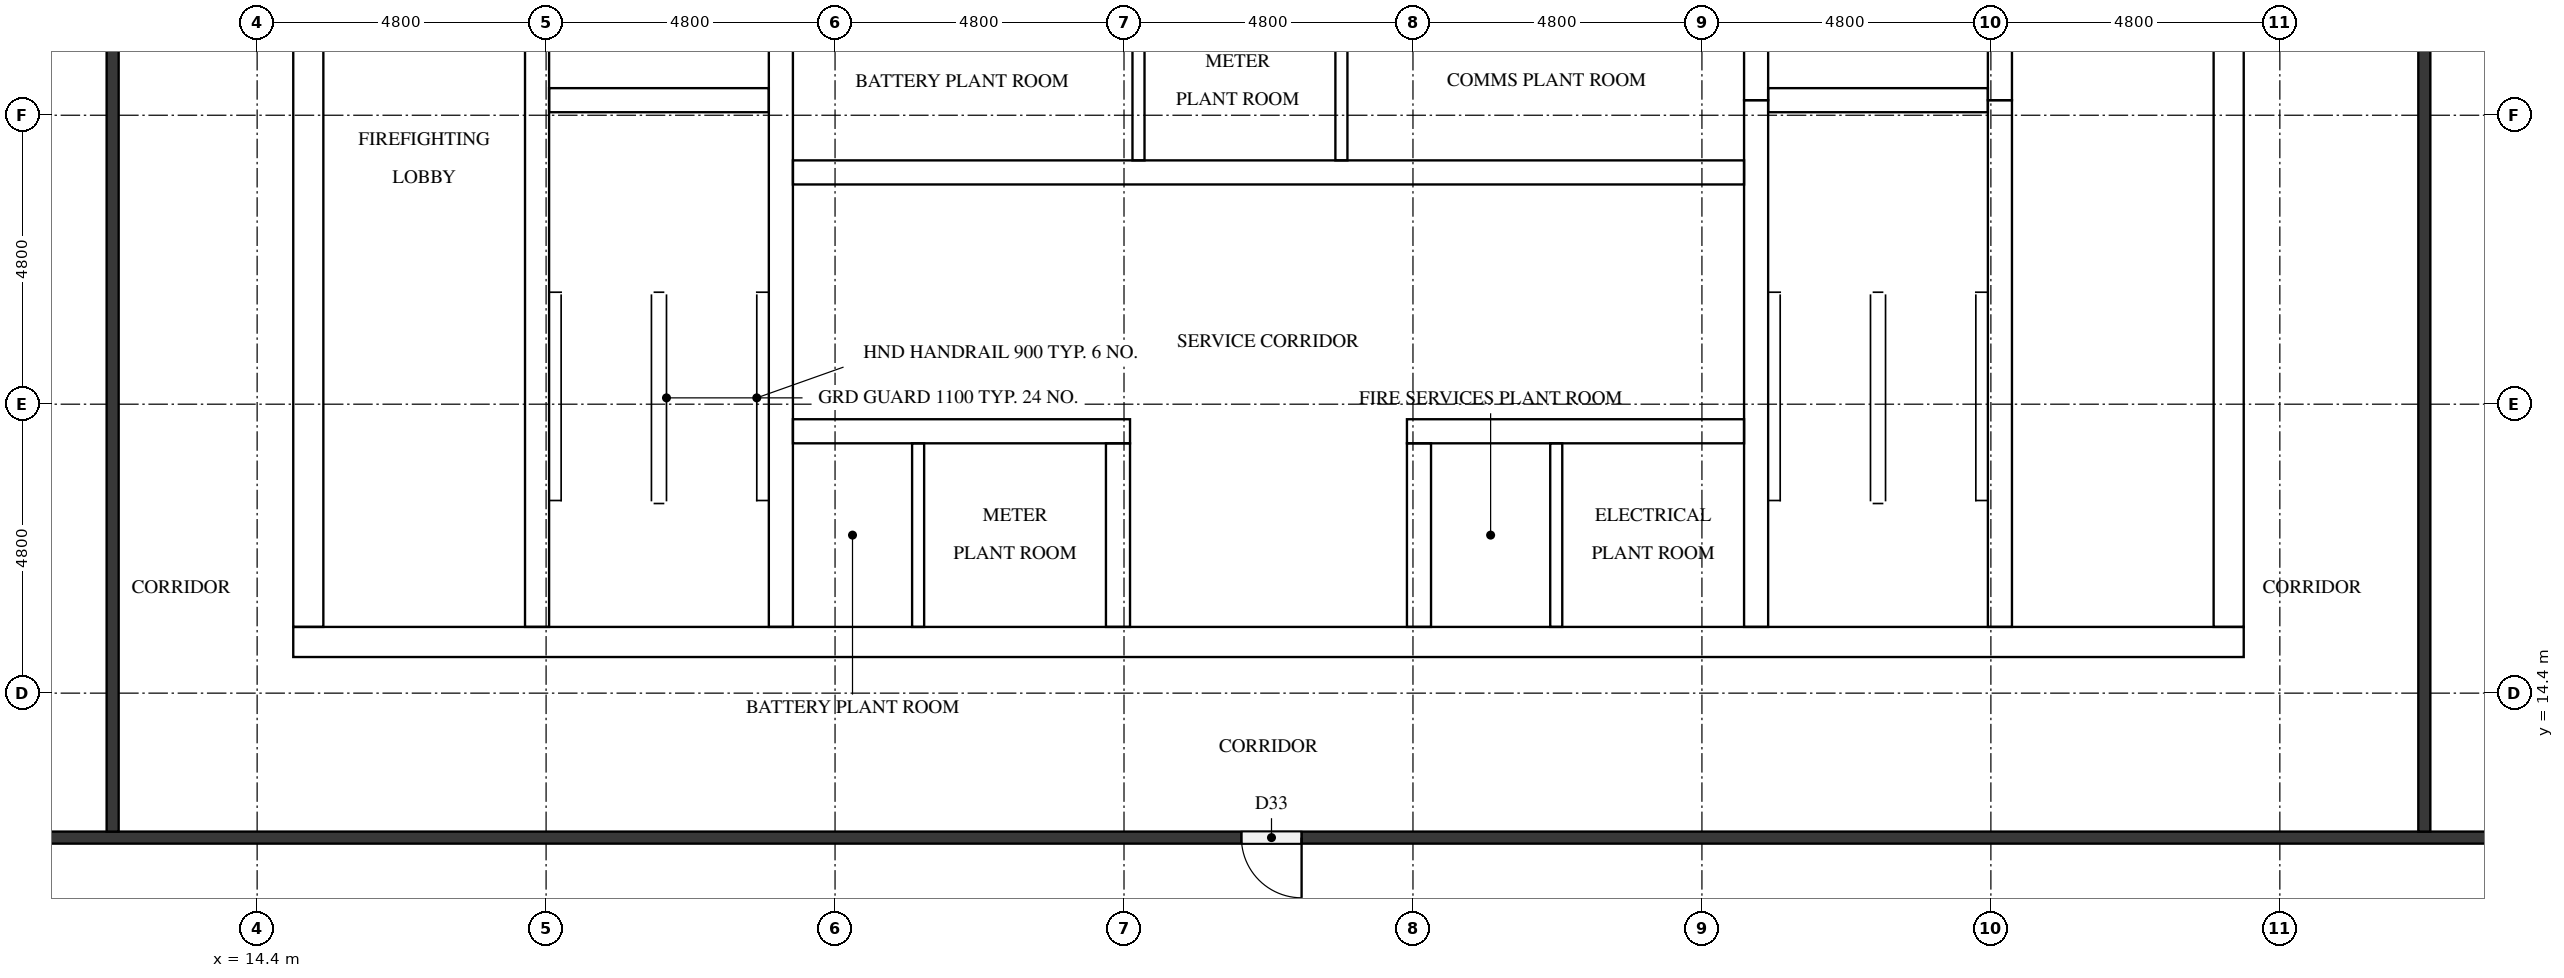
"""IFC4 building model, lengths in metres.
Left out: names, types, materials, properties, quantities, classifications, styles, units other than length and angle.
Written with IfcOpenShell. Run it as: python <this file> out.ifc"""

import sys

from ifc_helpers import new_model, si_unit, direction, frame, frame_2d, origin, place, context, subcontext, project, spatial, rectangle, extrude, element, fill, save


model = new_model("IFC4")
c1 = context("Model", 3, precision=1e-05, world=origin(), true_north=direction((0.0, 1.0)))
c2 = subcontext(c1, "Body", "Model", "MODEL_VIEW")
j1 = project(units=[si_unit("LENGTHUNIT", "METRE"), si_unit("PLANEANGLEUNIT", "RADIAN")], contexts=[c1])
p1 = place(None, origin())
s1 = spatial("IfcSite", under=j1, at=p1, CompositionType="ELEMENT")
p2 = place(p1, origin())
s2 = spatial("IfcBuilding", under=s1, at=p2, CompositionType="ELEMENT")
p3 = place(p2, frame((0.0, 0.0, 305.9)))
s3 = spatial("IfcBuildingStorey", under=s2, at=p3, CompositionType="ELEMENT", Elevation=305.9)
p4 = place(p3, frame((15.0, 15.25, 0.0), z_axis=(0.0, 0.0, 1.0), x_axis=(1.0, 0.0, 0.0)))
e1 = element("IfcWall", 1, at=p4, inside=s3, PredefinedType="SHEAR", context=c2, shape_type="SweptSolid", body=[
    extrude(rectangle(XDim=32.4, YDim=0.5, at=frame_2d((16.2, 0.0))), origin(), (0.0, 0.0, 1.0), 3.8),
])
p5 = place(p4, frame((15.3, 0.0, 0.0)))
e2 = element("IfcOpeningElement", 2, at=p5, cuts=e1, PredefinedType="OPENING", context=c2, shape_type="SweptSolid", body=[
    extrude(rectangle(XDim=1.8, YDim=2.1, at=frame_2d((0.9, 1.05))), frame((0.0, 0.26, 0.0), z_axis=(0.0, -1.0, 0.0), x_axis=(1.0, 0.0, 0.0)), (0.0, 0.0, 1.0), 0.52),
])
p6 = place(p3, frame((15.25, 15.5, 0.0), z_axis=(0.0, 0.0, 1.0), x_axis=(0.0, 1.0, 0.0)))
e3 = element("IfcWall", 3, at=p6, inside=s3, PredefinedType="SHEAR", context=c2, shape_type="SweptSolid", body=[
    extrude(rectangle(XDim=21.8, YDim=0.5, at=frame_2d((10.9, 0.0))), origin(), (0.0, 0.0, 1.0), 3.8),
])
p7 = place(p6, frame((5.26, 0.0, 0.0)))
e4 = element("IfcOpeningElement", 4, at=p7, cuts=e3, PredefinedType="OPENING", context=c2, shape_type="SweptSolid", body=[
    extrude(rectangle(XDim=1.2, YDim=2.1, at=frame_2d((0.6, 1.05))), frame((0.0, 0.26, 0.0), z_axis=(0.0, -1.0, 0.0), x_axis=(1.0, 0.0, 0.0)), (0.0, 0.0, 1.0), 0.52),
])
p8 = place(p3, frame((47.15, 15.5, 0.0), z_axis=(0.0, 0.0, 1.0), x_axis=(0.0, 1.0, 0.0)))
e5 = element("IfcWall", 5, at=p8, inside=s3, PredefinedType="SHEAR", context=c2, shape_type="SweptSolid", body=[
    extrude(rectangle(XDim=21.8, YDim=0.5, at=frame_2d((10.9, 0.0))), origin(), (0.0, 0.0, 1.0), 3.8),
])
p9 = place(p8, frame((10.6, 0.0, 0.0)))
e6 = element("IfcOpeningElement", 6, at=p9, cuts=e5, PredefinedType="OPENING", context=c2, shape_type="SweptSolid", body=[
    extrude(rectangle(XDim=1.2, YDim=2.1, at=frame_2d((0.6, 1.05))), frame((0.0, 0.26, 0.0), z_axis=(0.0, -1.0, 0.0), x_axis=(1.0, 0.0, 0.0)), (0.0, 0.0, 1.0), 0.52),
])
p10 = place(p3, frame((19.05, 15.5, 0.0), z_axis=(0.0, 0.0, 1.0), x_axis=(0.0, 1.0, 0.0)))
e7 = element("IfcWall", 7, at=p10, inside=s3, PredefinedType="SHEAR", context=c2, shape_type="SweptSolid", body=[
    extrude(rectangle(XDim=15.55, YDim=0.4, at=frame_2d((7.775, 0.0))), origin(), (0.0, 0.0, 1.0), 3.8),
])
p11 = place(p10, frame((9.95, 0.0, 0.0)))
e8 = element("IfcOpeningElement", 8, at=p11, cuts=e7, PredefinedType="OPENING", context=c2, shape_type="SweptSolid", body=[
    extrude(rectangle(XDim=1.1, YDim=2.1, at=frame_2d((0.55, 1.05))), frame((0.0, 0.21, 0.0), z_axis=(0.0, -1.0, 0.0), x_axis=(1.0, 0.0, 0.0)), (0.0, 0.0, 1.0), 0.42),
])
p12 = place(p10, frame((13.45, 0.0, 0.0)))
e9 = element("IfcOpeningElement", 9, at=p12, cuts=e7, PredefinedType="OPENING", context=c2, shape_type="SweptSolid", body=[
    extrude(rectangle(XDim=1.1, YDim=2.1, at=frame_2d((0.55, 1.05))), frame((0.0, 0.21, 0.0), z_axis=(0.0, -1.0, 0.0), x_axis=(1.0, 0.0, 0.0)), (0.0, 0.0, 1.0), 0.42),
])
p13 = place(p10, frame((0.7, 0.0, 0.0)))
e10 = element("IfcOpeningElement", 10, at=p13, cuts=e7, PredefinedType="OPENING", context=c2, shape_type="SweptSolid", body=[
    extrude(rectangle(XDim=1.2, YDim=2.1, at=frame_2d((0.6, 1.05))), frame((0.0, 0.21, 0.0), z_axis=(0.0, -1.0, 0.0), x_axis=(1.0, 0.0, 0.0)), (0.0, 0.0, 1.0), 0.42),
])
p14 = place(p3, frame((23.1, 15.5, 0.0), z_axis=(0.0, 0.0, 1.0), x_axis=(0.0, 1.0, 0.0)))
e11 = element("IfcWall", 11, at=p14, inside=s3, PredefinedType="SHEAR", context=c2, shape_type="SweptSolid", body=[
    extrude(rectangle(XDim=21.8, YDim=0.4, at=frame_2d((10.9, 0.0))), origin(), (0.0, 0.0, 1.0), 3.8),
])
p15 = place(p3, frame((39.3, 15.5, 0.0), z_axis=(0.0, 0.0, 1.0), x_axis=(0.0, 1.0, 0.0)))
e12 = element("IfcWall", 12, at=p15, inside=s3, PredefinedType="SHEAR", context=c2, shape_type="SweptSolid", body=[
    extrude(rectangle(XDim=8.75, YDim=0.4, at=frame_2d((4.375, 0.0))), origin(), (0.0, 0.0, 1.0), 3.8),
])
p16 = place(p3, frame((39.3, 24.25, 0.0), z_axis=(0.0, 0.0, 1.0), x_axis=(0.0, 1.0, 0.0)))
e13 = element("IfcWall", 13, at=p16, inside=s3, PredefinedType="SHEAR", context=c2, shape_type="SweptSolid", body=[
    extrude(rectangle(XDim=3.5, YDim=0.4, at=frame_2d((1.75, 0.0))), origin(), (0.0, 0.0, 1.0), 3.8),
])
p17 = place(p3, frame((43.35, 15.5, 0.0), z_axis=(0.0, 0.0, 1.0), x_axis=(0.0, 1.0, 0.0)))
e14 = element("IfcWall", 14, at=p17, inside=s3, PredefinedType="SHEAR", context=c2, shape_type="SweptSolid", body=[
    extrude(rectangle(XDim=8.75, YDim=0.4, at=frame_2d((4.375, 0.0))), origin(), (0.0, 0.0, 1.0), 3.8),
])
p18 = place(p17, frame((0.7, 0.0, 0.0)))
e15 = element("IfcOpeningElement", 15, at=p18, cuts=e14, PredefinedType="OPENING", context=c2, shape_type="SweptSolid", body=[
    extrude(rectangle(XDim=1.2, YDim=2.1, at=frame_2d((0.6, 1.05))), frame((0.0, 0.21, 0.0), z_axis=(0.0, -1.0, 0.0), x_axis=(1.0, 0.0, 0.0)), (0.0, 0.0, 1.0), 0.42),
])
p19 = place(p3, frame((43.35, 24.25, 0.0), z_axis=(0.0, 0.0, 1.0), x_axis=(0.0, 1.0, 0.0)))
e16 = element("IfcWall", 16, at=p19, inside=s3, PredefinedType="SHEAR", context=c2, shape_type="SweptSolid", body=[
    extrude(rectangle(XDim=3.5, YDim=0.4, at=frame_2d((1.75, 0.0))), origin(), (0.0, 0.0, 1.0), 3.8),
])
p20 = place(p19, frame((1.2, 0.0, 0.0)))
e17 = element("IfcOpeningElement", 17, at=p20, cuts=e16, PredefinedType="OPENING", context=c2, shape_type="SweptSolid", body=[
    extrude(rectangle(XDim=1.1, YDim=2.1, at=frame_2d((0.55, 1.05))), frame((0.0, 0.21, 0.0), z_axis=(0.0, -1.0, 0.0), x_axis=(1.0, 0.0, 0.0)), (0.0, 0.0, 1.0), 0.42),
])
for number, where, z_axis, x_axis in (
    (18, (19.25, 24.25, 0.0), (0.0, 0.0, 1.0), (1.0, 0.0, 0.0)),
    (19, (39.5, 24.25, 0.0), (0.0, 0.0, 1.0), (1.0, 0.0, 0.0)),
):
    element("IfcWall", number, at=place(p3, frame(where, z_axis=z_axis, x_axis=x_axis)), inside=s3, PredefinedType="SHEAR", context=c2, shape_type="SweptSolid", body=[
        extrude(rectangle(XDim=3.65, YDim=0.4, at=frame_2d((1.825, 0.0))), origin(), (0.0, 0.0, 1.0), 3.8),
    ])
p21 = place(p3, frame((23.3, 18.75, 0.0), z_axis=(0.0, 0.0, 1.0), x_axis=(1.0, 0.0, 0.0)))
e20 = element("IfcWall", 20, at=p21, inside=s3, PredefinedType="SHEAR", context=c2, shape_type="SweptSolid", body=[
    extrude(rectangle(XDim=5.6, YDim=0.4, at=frame_2d((2.8, 0.0))), origin(), (0.0, 0.0, 1.0), 3.8),
])
p22 = place(p21, frame((0.49, 0.0, 0.0)))
e21 = element("IfcOpeningElement", 21, at=p22, cuts=e20, PredefinedType="OPENING", context=c2, shape_type="SweptSolid", body=[
    extrude(rectangle(XDim=1.0, YDim=2.1, at=frame_2d((0.5, 1.05))), frame((0.0, 0.21, 0.0), z_axis=(0.0, -1.0, 0.0), x_axis=(1.0, 0.0, 0.0)), (0.0, 0.0, 1.0), 0.42),
])
p23 = place(p21, frame((3.19, 0.0, 0.0)))
e22 = element("IfcOpeningElement", 22, at=p23, cuts=e20, PredefinedType="OPENING", context=c2, shape_type="SweptSolid", body=[
    extrude(rectangle(XDim=1.0, YDim=2.1, at=frame_2d((0.5, 1.05))), frame((0.0, 0.21, 0.0), z_axis=(0.0, -1.0, 0.0), x_axis=(1.0, 0.0, 0.0)), (0.0, 0.0, 1.0), 0.42),
])
p24 = place(p3, frame((33.5, 18.75, 0.0), z_axis=(0.0, 0.0, 1.0), x_axis=(1.0, 0.0, 0.0)))
e23 = element("IfcWall", 23, at=p24, inside=s3, PredefinedType="SHEAR", context=c2, shape_type="SweptSolid", body=[
    extrude(rectangle(XDim=5.6, YDim=0.4, at=frame_2d((2.8, 0.0))), origin(), (0.0, 0.0, 1.0), 3.8),
])
p25 = place(p24, frame((0.89, 0.0, 0.0)))
e24 = element("IfcOpeningElement", 24, at=p25, cuts=e23, PredefinedType="OPENING", context=c2, shape_type="SweptSolid", body=[
    extrude(rectangle(XDim=1.0, YDim=2.1, at=frame_2d((0.5, 1.05))), frame((0.0, 0.21, 0.0), z_axis=(0.0, -1.0, 0.0), x_axis=(1.0, 0.0, 0.0)), (0.0, 0.0, 1.0), 0.42),
])
p26 = place(p24, frame((3.59, 0.0, 0.0)))
e25 = element("IfcOpeningElement", 25, at=p26, cuts=e23, PredefinedType="OPENING", context=c2, shape_type="SweptSolid", body=[
    extrude(rectangle(XDim=1.0, YDim=2.1, at=frame_2d((0.5, 1.05))), frame((0.0, 0.21, 0.0), z_axis=(0.0, -1.0, 0.0), x_axis=(1.0, 0.0, 0.0)), (0.0, 0.0, 1.0), 0.42),
])
p27 = place(p3, frame((23.3, 23.05, 0.0), z_axis=(0.0, 0.0, 1.0), x_axis=(1.0, 0.0, 0.0)))
e26 = element("IfcWall", 26, at=p27, inside=s3, PredefinedType="SHEAR", context=c2, shape_type="SweptSolid", body=[
    extrude(rectangle(XDim=15.8, YDim=0.4, at=frame_2d((7.9, 0.0))), origin(), (0.0, 0.0, 1.0), 3.8),
])
p28 = place(p27, frame((2.32, 0.0, 0.0)))
e27 = element("IfcOpeningElement", 27, at=p28, cuts=e26, PredefinedType="OPENING", context=c2, shape_type="SweptSolid", body=[
    extrude(rectangle(XDim=1.0, YDim=2.1, at=frame_2d((0.5, 1.05))), frame((0.0, 0.21, 0.0), z_axis=(0.0, -1.0, 0.0), x_axis=(1.0, 0.0, 0.0)), (0.0, 0.0, 1.0), 0.42),
])
p29 = place(p27, frame((6.926, 0.0, 0.0)))
e28 = element("IfcOpeningElement", 28, at=p29, cuts=e26, PredefinedType="OPENING", context=c2, shape_type="SweptSolid", body=[
    extrude(rectangle(XDim=1.0, YDim=2.1, at=frame_2d((0.5, 1.05))), frame((0.0, 0.21, 0.0), z_axis=(0.0, -1.0, 0.0), x_axis=(1.0, 0.0, 0.0)), (0.0, 0.0, 1.0), 0.42),
])
p30 = place(p27, frame((12.006, 0.0, 0.0)))
e29 = element("IfcOpeningElement", 29, at=p30, cuts=e26, PredefinedType="OPENING", context=c2, shape_type="SweptSolid", body=[
    extrude(rectangle(XDim=1.0, YDim=2.1, at=frame_2d((0.5, 1.05))), frame((0.0, 0.21, 0.0), z_axis=(0.0, -1.0, 0.0), x_axis=(1.0, 0.0, 0.0)), (0.0, 0.0, 1.0), 0.42),
])
for number, where, z_axis, x_axis in (
    (30, (28.7, 15.5, 0.0), (0.0, 0.0, 1.0), (0.0, 1.0, 0.0)),
    (31, (33.7, 15.5, 0.0), (0.0, 0.0, 1.0), (0.0, 1.0, 0.0)),
):
    element("IfcWall", number, at=place(p3, frame(where, z_axis=z_axis, x_axis=x_axis)), inside=s3, PredefinedType="SHEAR", context=c2, shape_type="SweptSolid", body=[
        extrude(rectangle(XDim=3.05, YDim=0.4, at=frame_2d((1.525, 0.0))), origin(), (0.0, 0.0, 1.0), 3.8),
    ])
for number, where, z_axis, x_axis in (
    (32, (29.041, 23.25, 0.0), (0.0, 0.0, 1.0), (0.0, 1.0, 0.0)),
    (33, (32.411, 23.25, 0.0), (0.0, 0.0, 1.0), (0.0, 1.0, 0.0)),
):
    element("IfcWall", number, at=place(p3, frame(where, z_axis=z_axis, x_axis=x_axis)), inside=s3, PredefinedType="PARTITIONING", context=c2, shape_type="SweptSolid", body=[
        extrude(rectangle(XDim=2.7, YDim=0.2, at=frame_2d((1.35, 0.0))), origin(), (0.0, 0.0, 1.0), 3.8),
    ])
for number, where, z_axis, x_axis in (
    (34, (25.38, 15.5, 0.0), (0.0, 0.0, 1.0), (0.0, 1.0, 0.0)),
    (35, (35.98, 15.5, 0.0), (0.0, 0.0, 1.0), (0.0, 1.0, 0.0)),
):
    element("IfcWall", number, at=place(p3, frame(where, z_axis=z_axis, x_axis=x_axis)), inside=s3, PredefinedType="PARTITIONING", context=c2, shape_type="SweptSolid", body=[
        extrude(rectangle(XDim=3.05, YDim=0.2, at=frame_2d((1.525, 0.0))), origin(), (0.0, 0.0, 1.0), 3.8),
    ])
p31 = place(p3, frame((56.3, 12.0, 0.0), z_axis=(0.0, 0.0, 1.0), x_axis=(-1.0, 0.0, 0.0)))
e36 = element("IfcWall", 36, at=p31, inside=s3, PredefinedType="PARTITIONING", context=c2, shape_type="SweptSolid", body=[
    extrude(rectangle(XDim=55.0, YDim=0.2, at=frame_2d((27.5, 0.0))), origin(), (0.0, 0.0, 1.0), 3.8),
])
p32 = place(p31, frame((24.55, 0.0, 0.0)))
e37 = element("IfcOpeningElement", 37, at=p32, cuts=e36, PredefinedType="OPENING", context=c2, shape_type="SweptSolid", body=[
    extrude(rectangle(XDim=1.0, YDim=2.1, at=frame_2d((0.5, 1.05))), frame((0.0, 0.11, 0.0), z_axis=(0.0, -1.0, 0.0), x_axis=(1.0, 0.0, 0.0)), (0.0, 0.0, 1.0), 0.22),
])
p33 = place(p3, frame((12.0, 12.1, 0.0), z_axis=(0.0, 0.0, 1.0), x_axis=(0.0, 1.0, 0.0)))
e38 = element("IfcWall", 38, at=p33, inside=s3, PredefinedType="PARTITIONING", context=c2, shape_type="SweptSolid", body=[
    extrude(rectangle(XDim=28.6, YDim=0.2, at=frame_2d((14.3, 0.0))), origin(), (0.0, 0.0, 1.0), 3.8),
])
p34 = place(p33, frame((13.75, 0.0, 0.0)))
e39 = element("IfcOpeningElement", 39, at=p34, cuts=e38, PredefinedType="OPENING", context=c2, shape_type="SweptSolid", body=[
    extrude(rectangle(XDim=1.0, YDim=2.1, at=frame_2d((0.5, 1.05))), frame((0.0, 0.11, 0.0), z_axis=(0.0, -1.0, 0.0), x_axis=(1.0, 0.0, 0.0)), (0.0, 0.0, 1.0), 0.22),
])
p35 = place(p3, frame((50.4, 40.7, 0.0), z_axis=(0.0, 0.0, 1.0), x_axis=(0.0, -1.0, 0.0)))
e40 = element("IfcWall", 40, at=p35, inside=s3, PredefinedType="PARTITIONING", context=c2, shape_type="SweptSolid", body=[
    extrude(rectangle(XDim=28.6, YDim=0.2, at=frame_2d((14.3, 0.0))), origin(), (0.0, 0.0, 1.0), 3.8),
])
p36 = place(p35, frame((13.75, 0.0, 0.0)))
e41 = element("IfcOpeningElement", 41, at=p36, cuts=e40, PredefinedType="OPENING", context=c2, shape_type="SweptSolid", body=[
    extrude(rectangle(XDim=1.0, YDim=2.1, at=frame_2d((0.5, 1.05))), frame((0.0, 0.11, 0.0), z_axis=(0.0, -1.0, 0.0), x_axis=(1.0, 0.0, 0.0)), (0.0, 0.0, 1.0), 0.22),
])
p37 = place(p13, frame((1.2, 0.0, 0.0), z_axis=(0.0, 0.0, 1.0), x_axis=(-1.0, 0.0, 0.0)))
e42 = element("IfcDoor", 42, at=p37, inside=s3, OperationType="SINGLE_SWING_LEFT", PredefinedType="DOOR", context=c2, shape_type="SweptSolid", body=[
    extrude(rectangle(XDim=1.2, YDim=2.1, at=frame_2d((0.6, 1.05))), frame((0.0, 0.025, 0.0), z_axis=(0.0, -1.0, 0.0), x_axis=(1.0, 0.0, 0.0)), (0.0, 0.0, 1.0), 0.05),
])
fill(e10, e42)
p38 = place(p18, origin())
e43 = element("IfcDoor", 43, at=p38, inside=s3, OperationType="SINGLE_SWING_RIGHT", PredefinedType="DOOR", context=c2, shape_type="SweptSolid", body=[
    extrude(rectangle(XDim=1.2, YDim=2.1, at=frame_2d((0.6, 1.05))), frame((0.0, 0.025, 0.0), z_axis=(0.0, -1.0, 0.0), x_axis=(1.0, 0.0, 0.0)), (0.0, 0.0, 1.0), 0.05),
])
fill(e15, e43)
p39 = place(p5, frame((1.8, 0.0, 0.0), z_axis=(0.0, 0.0, 1.0), x_axis=(-1.0, 0.0, 0.0)))
e44 = element("IfcDoor", 44, at=p39, inside=s3, OperationType="DOUBLE_DOOR_SINGLE_SWING", PredefinedType="DOOR", context=c2, shape_type="SweptSolid", body=[
    extrude(rectangle(XDim=1.8, YDim=2.1, at=frame_2d((0.9, 1.05))), frame((0.0, 0.025, 0.0), z_axis=(0.0, -1.0, 0.0), x_axis=(1.0, 0.0, 0.0)), (0.0, 0.0, 1.0), 0.05),
])
fill(e2, e44)
p40 = place(p7, frame((1.2, 0.0, 0.0), z_axis=(0.0, 0.0, 1.0), x_axis=(-1.0, 0.0, 0.0)))
e45 = element("IfcDoor", 45, at=p40, inside=s3, OperationType="SINGLE_SWING_RIGHT", PredefinedType="DOOR", context=c2, shape_type="SweptSolid", body=[
    extrude(rectangle(XDim=1.2, YDim=2.1, at=frame_2d((0.6, 1.05))), frame((0.0, 0.025, 0.0), z_axis=(0.0, -1.0, 0.0), x_axis=(1.0, 0.0, 0.0)), (0.0, 0.0, 1.0), 0.05),
])
fill(e4, e45)
p41 = place(p28, frame((1.0, 0.0, 0.0), z_axis=(0.0, 0.0, 1.0), x_axis=(-1.0, 0.0, 0.0)))
e46 = element("IfcDoor", 46, at=p41, inside=s3, OperationType="SINGLE_SWING_RIGHT", PredefinedType="DOOR", context=c2, shape_type="SweptSolid", body=[
    extrude(rectangle(XDim=1.0, YDim=2.1, at=frame_2d((0.5, 1.05))), frame((0.0, 0.025, 0.0), z_axis=(0.0, -1.0, 0.0), x_axis=(1.0, 0.0, 0.0)), (0.0, 0.0, 1.0), 0.05),
])
fill(e27, e46)
p42 = place(p29, frame((1.0, 0.0, 0.0), z_axis=(0.0, 0.0, 1.0), x_axis=(-1.0, 0.0, 0.0)))
e47 = element("IfcDoor", 47, at=p42, inside=s3, OperationType="SINGLE_SWING_LEFT", PredefinedType="DOOR", context=c2, shape_type="SweptSolid", body=[
    extrude(rectangle(XDim=1.0, YDim=2.1, at=frame_2d((0.5, 1.05))), frame((0.0, 0.025, 0.0), z_axis=(0.0, -1.0, 0.0), x_axis=(1.0, 0.0, 0.0)), (0.0, 0.0, 1.0), 0.05),
])
fill(e28, e47)
p43 = place(p30, frame((1.0, 0.0, 0.0), z_axis=(0.0, 0.0, 1.0), x_axis=(-1.0, 0.0, 0.0)))
e48 = element("IfcDoor", 48, at=p43, inside=s3, OperationType="SINGLE_SWING_RIGHT", PredefinedType="DOOR", context=c2, shape_type="SweptSolid", body=[
    extrude(rectangle(XDim=1.0, YDim=2.1, at=frame_2d((0.5, 1.05))), frame((0.0, 0.025, 0.0), z_axis=(0.0, -1.0, 0.0), x_axis=(1.0, 0.0, 0.0)), (0.0, 0.0, 1.0), 0.05),
])
fill(e29, e48)
p44 = place(p22, origin())
e49 = element("IfcDoor", 49, at=p44, inside=s3, OperationType="SINGLE_SWING_RIGHT", PredefinedType="DOOR", context=c2, shape_type="SweptSolid", body=[
    extrude(rectangle(XDim=1.0, YDim=2.1, at=frame_2d((0.5, 1.05))), frame((0.0, 0.025, 0.0), z_axis=(0.0, -1.0, 0.0), x_axis=(1.0, 0.0, 0.0)), (0.0, 0.0, 1.0), 0.05),
])
fill(e21, e49)
p45 = place(p23, origin())
e50 = element("IfcDoor", 50, at=p45, inside=s3, OperationType="SINGLE_SWING_LEFT", PredefinedType="DOOR", context=c2, shape_type="SweptSolid", body=[
    extrude(rectangle(XDim=1.0, YDim=2.1, at=frame_2d((0.5, 1.05))), frame((0.0, 0.025, 0.0), z_axis=(0.0, -1.0, 0.0), x_axis=(1.0, 0.0, 0.0)), (0.0, 0.0, 1.0), 0.05),
])
fill(e22, e50)
p46 = place(p25, origin())
e51 = element("IfcDoor", 51, at=p46, inside=s3, OperationType="SINGLE_SWING_RIGHT", PredefinedType="DOOR", context=c2, shape_type="SweptSolid", body=[
    extrude(rectangle(XDim=1.0, YDim=2.1, at=frame_2d((0.5, 1.05))), frame((0.0, 0.025, 0.0), z_axis=(0.0, -1.0, 0.0), x_axis=(1.0, 0.0, 0.0)), (0.0, 0.0, 1.0), 0.05),
])
fill(e24, e51)
p47 = place(p26, origin())
e52 = element("IfcDoor", 52, at=p47, inside=s3, OperationType="SINGLE_SWING_LEFT", PredefinedType="DOOR", context=c2, shape_type="SweptSolid", body=[
    extrude(rectangle(XDim=1.0, YDim=2.1, at=frame_2d((0.5, 1.05))), frame((0.0, 0.025, 0.0), z_axis=(0.0, -1.0, 0.0), x_axis=(1.0, 0.0, 0.0)), (0.0, 0.0, 1.0), 0.05),
])
fill(e25, e52)
p48 = place(p32, origin())
e53 = element("IfcDoor", 53, at=p48, inside=s3, OperationType="SINGLE_SWING_LEFT", PredefinedType="DOOR", context=c2, shape_type="SweptSolid", body=[
    extrude(rectangle(XDim=1.0, YDim=2.1, at=frame_2d((0.5, 1.05))), frame((0.0, 0.025, 0.0), z_axis=(0.0, -1.0, 0.0), x_axis=(1.0, 0.0, 0.0)), (0.0, 0.0, 1.0), 0.05),
])
fill(e37, e53)
save(model, sys.argv[1])
